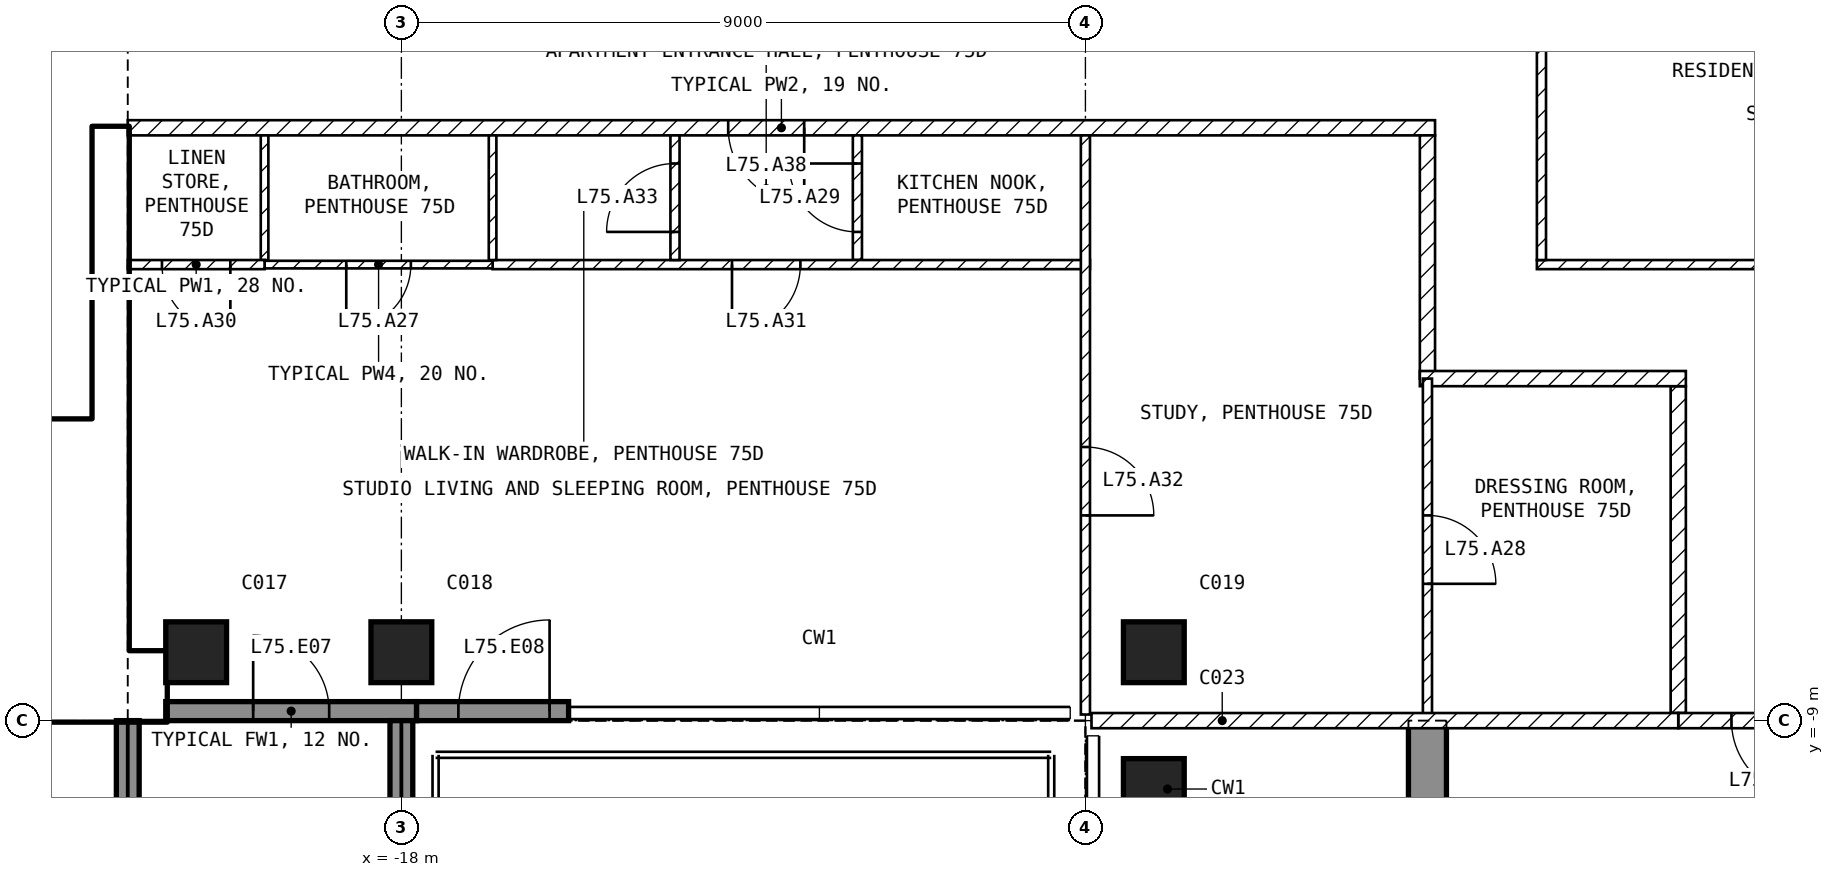
"""IFC4 building model, lengths in metres.
Left out: names, types, materials, properties, quantities, classifications, styles, units other than length and angle.
Written with IfcOpenShell. Run it as: python <this file> out.ifc"""

import sys

from ifc_helpers import new_model, si_unit, direction, frame, frame_2d, origin, origin_2d, place, context, subcontext, project, spatial, polyline, rectangle, outline, extrude, element, fill, save


model = new_model("IFC4")
c1 = context("Model", 3, precision=1e-05, world=origin(), true_north=direction((0.0, 1.0)))
c2 = subcontext(c1, "Body", "Model", "MODEL_VIEW")
j1 = project(units=[si_unit("LENGTHUNIT", "METRE"), si_unit("PLANEANGLEUNIT", "RADIAN")], contexts=[c1])
p1 = place(None, origin())
s1 = spatial("IfcSite", under=j1, at=p1, CompositionType="ELEMENT")
p2 = place(p1, origin())
s2 = spatial("IfcBuilding", under=s1, at=p2, CompositionType="ELEMENT")
p3 = place(p2, frame((0.0, 0.0, 294.6)))
s3 = spatial("IfcBuildingStorey", under=s2, at=p3, CompositionType="ELEMENT", Elevation=294.6)
for number, where, z_axis, x_axis in (
    (1, (-20.7, -8.1, -0.25), (0.0, 0.0, 1.0), (1.0, 0.0, 0.0)),
    (2, (-18.0, -8.1, -0.25), (0.0, 0.0, 1.0), (1.0, 0.0, 0.0)),
    (3, (-8.1, -9.9, -0.25), (0.0, 0.0, 1.0), (1.0, 0.0, 0.0)),
    (4, (-8.1, -8.1, -0.25), (0.0, 0.0, 1.0), (1.0, 0.0, 0.0)),
):
    element("IfcColumn", number, at=place(p3, frame(where, z_axis=z_axis, x_axis=x_axis)), inside=s3, PredefinedType="COLUMN", context=c2, shape_type="SweptSolid", body=[
        extrude(rectangle(XDim=0.8, YDim=0.8, at=origin_2d()), origin(), (0.0, 0.0, 1.0), 4.2),
    ])
p4 = place(p3, frame((-4.75, -13.1, -0.25), z_axis=(1.0, 0.0, 0.0), x_axis=(0.0, 1.0, 0.0)))
e5 = element("IfcWall", 5, at=p4, inside=s3, PredefinedType="SHEAR", context=c2, shape_type="SweptSolid", body=[
    extrude(outline(polyline([(0.0, 0.0), (4.1, 0.0), (4.1, 4.2), (0.0, 4.2), (0.0, 0.0)])), origin(), (0.0, 0.0, 1.0), 0.5),
])
p5 = place(p3, frame((-21.1, -8.875, 0.0), z_axis=(0.0, 0.0, 1.0), x_axis=(1.0, 0.0, 0.0)))
e6 = element("IfcWall", 6, at=p5, inside=s3, PredefinedType="SOLIDWALL", context=c2, shape_type="SweptSolid", body=[
    extrude(rectangle(XDim=3.3, YDim=0.25, at=frame_2d((1.65, 0.0))), origin(), (0.0, 0.0, 1.0), 3.95),
])
p6 = place(p5, frame((1.15, 0.0, 0.0)))
e7 = element("IfcOpeningElement", 7, at=p6, cuts=e6, PredefinedType="OPENING", context=c2, shape_type="SweptSolid", body=[
    extrude(rectangle(XDim=1.0, YDim=2.4, at=frame_2d((0.5, 1.2))), frame((0.0, 0.135, 0.0), z_axis=(0.0, -1.0, 0.0), x_axis=(1.0, 0.0, 0.0)), (0.0, 0.0, 1.0), 0.27),
])
p7 = place(p3, frame((-17.8, -8.875, 0.0), z_axis=(0.0, 0.0, 1.0), x_axis=(1.0, 0.0, 0.0)))
e8 = element("IfcWall", 8, at=p7, inside=s3, PredefinedType="SOLIDWALL", context=c2, shape_type="SweptSolid", body=[
    extrude(rectangle(XDim=2.0, YDim=0.25, at=frame_2d((1.0, 0.0))), origin(), (0.0, 0.0, 1.0), 3.95),
])
p8 = place(p7, frame((0.55, 0.0, 0.0)))
e9 = element("IfcOpeningElement", 9, at=p8, cuts=e8, PredefinedType="OPENING", context=c2, shape_type="SweptSolid", body=[
    extrude(rectangle(XDim=1.2, YDim=2.4, at=frame_2d((0.6, 1.2))), frame((0.0, 0.135, 0.0), z_axis=(0.0, -1.0, 0.0), x_axis=(1.0, 0.0, 0.0)), (0.0, 0.0, 1.0), 0.27),
])
p9 = place(p3, frame((-21.6, -9.0, 0.0), z_axis=(0.0, 0.0, 1.0), x_axis=(0.0, -1.0, 0.0)))
e10 = element("IfcWall", 10, at=p9, inside=s3, PredefinedType="SOLIDWALL", context=c2, shape_type="SweptSolid", body=[
    extrude(rectangle(XDim=2.7, YDim=0.3, at=frame_2d((1.35, 0.0))), origin(), (0.0, 0.0, 1.0), 3.95),
])
p10 = place(p3, frame((-18.0, -9.0, 0.0), z_axis=(0.0, 0.0, 1.0), x_axis=(0.0, -1.0, 0.0)))
e11 = element("IfcWall", 11, at=p10, inside=s3, PredefinedType="SOLIDWALL", context=c2, shape_type="SweptSolid", body=[
    extrude(rectangle(XDim=2.74, YDim=0.3, at=frame_2d((1.37, 0.0))), origin(), (0.0, 0.0, 1.0), 3.95),
])
p11 = place(p3, frame((-30.2, -8.55, 0.0), z_axis=(0.0, 0.0, 1.0), x_axis=(1.0, 0.0, 0.0)))
e12 = element("IfcWall", 12, at=p11, inside=s3, PredefinedType="SHEAR", context=c2, shape_type="SweptSolid", body=[
    extrude(rectangle(XDim=9.1, YDim=0.9, at=frame_2d((4.55, 0.0))), origin(), (0.0, 0.0, 1.0), 3.95),
])
p12 = place(p3, frame((-21.825, -8.1, 0.0), z_axis=(0.0, 0.0, 1.0), x_axis=(0.0, 1.0, 0.0)))
e13 = element("IfcWall", 13, at=p12, inside=s3, PredefinedType="SHEAR", context=c2, shape_type="SweptSolid", body=[
    extrude(rectangle(XDim=6.9, YDim=0.45, at=frame_2d((3.45, 0.0))), origin(), (0.0, 0.0, 1.0), 3.95),
])
p13 = place(p3, frame((-28.35, -5.15, 0.0), z_axis=(0.0, 0.0, 1.0), x_axis=(1.0, 0.0, 0.0)))
e14 = element("IfcWall", 14, at=p13, inside=s3, PredefinedType="SOLIDWALL", context=c2, shape_type="SweptSolid", body=[
    extrude(rectangle(XDim=6.3, YDim=0.2, at=frame_2d((3.15, 0.0))), origin(), (0.0, 0.0, 1.0), 3.95),
])
p14 = place(p13, frame((5.1, 0.0, 0.0)))
e15 = element("IfcOpeningElement", 15, at=p14, cuts=e14, PredefinedType="OPENING", context=c2, shape_type="SweptSolid", body=[
    extrude(rectangle(XDim=1.0, YDim=2.1, at=frame_2d((0.5, 1.05))), frame((0.0, 0.11, 0.0), z_axis=(0.0, -1.0, 0.0), x_axis=(1.0, 0.0, 0.0)), (0.0, 0.0, 1.0), 0.22),
])
p15 = place(p3, frame((-3.06, -3.0, 0.0), z_axis=(0.0, 0.0, 1.0), x_axis=(1.0, 0.0, 0.0)))
e16 = element("IfcWall", 16, at=p15, inside=s3, PredefinedType="PARTITIONING", context=c2, shape_type="SweptSolid", body=[
    extrude(rectangle(XDim=6.12, YDim=0.12, at=frame_2d((3.06, 0.0))), origin(), (0.0, 0.0, 1.0), 3.95),
])
p16 = place(p3, frame((-3.0, 2.94, 0.0), z_axis=(0.0, 0.0, 1.0), x_axis=(0.0, -1.0, 0.0)))
e17 = element("IfcWall", 17, at=p16, inside=s3, PredefinedType="PARTITIONING", context=c2, shape_type="SweptSolid", body=[
    extrude(rectangle(XDim=5.88, YDim=0.12, at=frame_2d((2.94, 0.0))), origin(), (0.0, 0.0, 1.0), 3.95),
])
p17 = place(p3, frame((-4.4, -1.2, 0.0), z_axis=(0.0, 0.0, 1.0), x_axis=(-1.0, 0.0, 0.0)))
e18 = element("IfcWall", 18, at=p17, inside=s3, PredefinedType="PARTITIONING", context=c2, shape_type="SweptSolid", body=[
    extrude(rectangle(XDim=17.2, YDim=0.2, at=frame_2d((8.6, 0.0))), origin(), (0.0, 0.0, 1.0), 3.95),
])
p18 = place(p17, frame((8.3, 0.0, 0.0)))
e19 = element("IfcOpeningElement", 19, at=p18, cuts=e18, PredefinedType="OPENING", context=c2, shape_type="SweptSolid", body=[
    extrude(rectangle(XDim=1.0, YDim=2.1, at=frame_2d((0.5, 1.05))), frame((0.0, 0.11, 0.0), z_axis=(0.0, -1.0, 0.0), x_axis=(1.0, 0.0, 0.0)), (0.0, 0.0, 1.0), 0.22),
])
p19 = place(p3, frame((-4.5, -4.5, 0.0), z_axis=(0.0, 0.0, 1.0), x_axis=(0.0, 1.0, 0.0)))
e20 = element("IfcWall", 20, at=p19, inside=s3, PredefinedType="PARTITIONING", context=c2, shape_type="SweptSolid", body=[
    extrude(rectangle(XDim=3.2, YDim=0.2, at=frame_2d((1.6, 0.0))), origin(), (0.0, 0.0, 1.0), 3.95),
])
p20 = place(p3, frame((-1.2, -8.9, 0.0), z_axis=(0.0, 0.0, 1.0), x_axis=(0.0, 1.0, 0.0)))
e21 = element("IfcWall", 21, at=p20, inside=s3, PredefinedType="PARTITIONING", context=c2, shape_type="SweptSolid", body=[
    extrude(rectangle(XDim=4.3, YDim=0.2, at=frame_2d((2.15, 0.0))), origin(), (0.0, 0.0, 1.0), 3.95),
])
p21 = place(p3, frame((-1.1, -4.5, 0.0), z_axis=(0.0, 0.0, 1.0), x_axis=(-1.0, 0.0, 0.0)))
e22 = element("IfcWall", 22, at=p21, inside=s3, PredefinedType="PARTITIONING", context=c2, shape_type="SweptSolid", body=[
    extrude(rectangle(XDim=3.5, YDim=0.2, at=frame_2d((1.75, 0.0))), origin(), (0.0, 0.0, 1.0), 3.95),
])
p22 = place(p3, frame((1.2, -9.0, 0.0), z_axis=(0.0, 0.0, 1.0), x_axis=(-1.0, 0.0, 0.0)))
e23 = element("IfcWall", 23, at=p22, inside=s3, PredefinedType="PARTITIONING", context=c2, shape_type="SweptSolid", body=[
    extrude(rectangle(XDim=2.4, YDim=0.2, at=frame_2d((1.2, 0.0))), origin(), (0.0, 0.0, 1.0), 3.95),
])
p23 = place(p22, frame((0.7, 0.0, 0.0)))
e24 = element("IfcOpeningElement", 24, at=p23, cuts=e23, PredefinedType="OPENING", context=c2, shape_type="SweptSolid", body=[
    extrude(rectangle(XDim=1.0, YDim=2.1, at=frame_2d((0.5, 1.05))), frame((0.0, 0.11, 0.0), z_axis=(0.0, -1.0, 0.0), x_axis=(1.0, 0.0, 0.0)), (0.0, 0.0, 1.0), 0.22),
])
p24 = place(p3, frame((-12.0, -2.94, 0.0), z_axis=(0.0, 0.0, 1.0), x_axis=(0.0, 1.0, 0.0)))
e25 = element("IfcWall", 25, at=p24, inside=s3, PredefinedType="PARTITIONING", context=c2, shape_type="SweptSolid", body=[
    extrude(rectangle(XDim=1.64, YDim=0.12, at=frame_2d((0.82, 0.0))), origin(), (0.0, 0.0, 1.0), 3.95),
])
p25 = place(p24, frame((0.37, 0.0, 0.0)))
e26 = element("IfcOpeningElement", 26, at=p25, cuts=e25, PredefinedType="OPENING", context=c2, shape_type="SweptSolid", body=[
    extrude(rectangle(XDim=0.9, YDim=2.1, at=frame_2d((0.45, 1.05))), frame((0.0, 0.07, 0.0), z_axis=(0.0, -1.0, 0.0), x_axis=(1.0, 0.0, 0.0)), (0.0, 0.0, 1.0), 0.14),
])
p26 = place(p3, frame((-8.94, -3.0, 0.0), z_axis=(0.0, 0.0, 1.0), x_axis=(-1.0, 0.0, 0.0)))
e27 = element("IfcWall", 27, at=p26, inside=s3, PredefinedType="PARTITIONING", context=c2, shape_type="SweptSolid", body=[
    extrude(rectangle(XDim=7.86, YDim=0.12, at=frame_2d((3.93, 0.0))), origin(), (0.0, 0.0, 1.0), 3.95),
])
p27 = place(p26, frame((3.81, 0.0, 0.0)))
e28 = element("IfcOpeningElement", 28, at=p27, cuts=e27, PredefinedType="OPENING", context=c2, shape_type="SweptSolid", body=[
    extrude(rectangle(XDim=0.9, YDim=2.1, at=frame_2d((0.45, 1.05))), frame((0.0, 0.07, 0.0), z_axis=(0.0, -1.0, 0.0), x_axis=(1.0, 0.0, 0.0)), (0.0, 0.0, 1.0), 0.14),
])
p28 = place(p3, frame((-9.0, -1.3, 0.0), z_axis=(0.0, 0.0, 1.0), x_axis=(0.0, -1.0, 0.0)))
e29 = element("IfcWall", 29, at=p28, inside=s3, PredefinedType="PARTITIONING", context=c2, shape_type="SweptSolid", body=[
    extrude(rectangle(XDim=7.62, YDim=0.12, at=frame_2d((3.81, 0.0))), origin(), (0.0, 0.0, 1.0), 3.95),
])
p29 = place(p28, frame((4.1, 0.0, 0.0)))
e30 = element("IfcOpeningElement", 30, at=p29, cuts=e29, PredefinedType="OPENING", context=c2, shape_type="SweptSolid", body=[
    extrude(rectangle(XDim=0.9, YDim=2.1, at=frame_2d((0.45, 1.05))), frame((0.0, 0.07, 0.0), z_axis=(0.0, -1.0, 0.0), x_axis=(1.0, 0.0, 0.0)), (0.0, 0.0, 1.0), 0.14),
])
p30 = place(p3, frame((-14.4, -2.94, 0.0), z_axis=(0.0, 0.0, 1.0), x_axis=(0.0, 1.0, 0.0)))
e31 = element("IfcWall", 31, at=p30, inside=s3, PredefinedType="PARTITIONING", context=c2, shape_type="SweptSolid", body=[
    extrude(rectangle(XDim=1.64, YDim=0.12, at=frame_2d((0.82, 0.0))), origin(), (0.0, 0.0, 1.0), 3.95),
])
p31 = place(p30, frame((0.37, 0.0, 0.0)))
e32 = element("IfcOpeningElement", 32, at=p31, cuts=e31, PredefinedType="OPENING", context=c2, shape_type="SweptSolid", body=[
    extrude(rectangle(XDim=0.9, YDim=2.1, at=frame_2d((0.45, 1.05))), frame((0.0, 0.07, 0.0), z_axis=(0.0, -1.0, 0.0), x_axis=(1.0, 0.0, 0.0)), (0.0, 0.0, 1.0), 0.14),
])
for number, where, z_axis, x_axis in (
    (33, (-16.8, -2.94, 0.0), (0.0, 0.0, 1.0), (0.0, 1.0, 0.0)),
    (34, (-19.8, -2.94, 0.0), (0.0, 0.0, 1.0), (0.0, 1.0, 0.0)),
):
    element("IfcWall", number, at=place(p3, frame(where, z_axis=z_axis, x_axis=x_axis)), inside=s3, PredefinedType="PARTITIONING", context=c2, shape_type="SweptSolid", body=[
        extrude(rectangle(XDim=1.64, YDim=0.1, at=frame_2d((0.82, 0.0))), origin(), (0.0, 0.0, 1.0), 3.95),
    ])
p32 = place(p3, frame((-16.8, -3.0, 0.0), z_axis=(0.0, 0.0, 1.0), x_axis=(-1.0, 0.0, 0.0)))
e35 = element("IfcWall", 35, at=p32, inside=s3, PredefinedType="PARTITIONING", context=c2, shape_type="SweptSolid", body=[
    extrude(rectangle(XDim=3.0, YDim=0.1, at=frame_2d((1.5, 0.0))), origin(), (0.0, 0.0, 1.0), 3.95),
])
p33 = place(p32, frame((1.075, 0.0, 0.0)))
e36 = element("IfcOpeningElement", 36, at=p33, cuts=e35, PredefinedType="OPENING", context=c2, shape_type="SweptSolid", body=[
    extrude(rectangle(XDim=0.85, YDim=2.1, at=frame_2d((0.425, 1.05))), frame((0.0, 0.06, 0.0), z_axis=(0.0, -1.0, 0.0), x_axis=(1.0, 0.0, 0.0)), (0.0, 0.0, 1.0), 0.12),
])
p34 = place(p3, frame((-19.8, -3.0, 0.0), z_axis=(0.0, 0.0, 1.0), x_axis=(-1.0, 0.0, 0.0)))
e37 = element("IfcWall", 37, at=p34, inside=s3, PredefinedType="PARTITIONING", context=c2, shape_type="SweptSolid", body=[
    extrude(rectangle(XDim=1.8, YDim=0.12, at=frame_2d((0.9, 0.0))), origin(), (0.0, 0.0, 1.0), 3.95),
])
p35 = place(p34, frame((0.45, 0.0, 0.0)))
e38 = element("IfcOpeningElement", 38, at=p35, cuts=e37, PredefinedType="OPENING", context=c2, shape_type="SweptSolid", body=[
    extrude(rectangle(XDim=0.9, YDim=2.1, at=frame_2d((0.45, 1.05))), frame((0.0, 0.07, 0.0), z_axis=(0.0, -1.0, 0.0), x_axis=(1.0, 0.0, 0.0)), (0.0, 0.0, 1.0), 0.14),
])
p36 = place(p3, frame((-4.5, -4.5, 0.0), z_axis=(0.0, 0.0, 1.0), x_axis=(0.0, -1.0, 0.0)))
e39 = element("IfcWall", 39, at=p36, inside=s3, PredefinedType="PARTITIONING", context=c2, shape_type="SweptSolid", body=[
    extrude(rectangle(XDim=4.5, YDim=0.12, at=frame_2d((2.25, 0.0))), origin(), (0.0, 0.0, 1.0), 3.95),
])
p37 = place(p36, frame((1.8, 0.0, 0.0)))
e40 = element("IfcOpeningElement", 40, at=p37, cuts=e39, PredefinedType="OPENING", context=c2, shape_type="SweptSolid", body=[
    extrude(rectangle(XDim=0.9, YDim=2.1, at=frame_2d((0.45, 1.05))), frame((0.0, 0.07, 0.0), z_axis=(0.0, -1.0, 0.0), x_axis=(1.0, 0.0, 0.0)), (0.0, 0.0, 1.0), 0.14),
])
p38 = place(p3, frame((-1.2, -9.0, 0.0), z_axis=(0.0, 0.0, 1.0), x_axis=(-1.0, 0.0, 0.0)))
e41 = element("IfcWall", 41, at=p38, inside=s3, PredefinedType="PARTITIONING", context=c2, shape_type="SweptSolid", body=[
    extrude(rectangle(XDim=7.72, YDim=0.2, at=frame_2d((3.86, 0.0))), origin(), (0.0, 0.0, 1.0), 3.95),
])
p39 = place(p6, origin())
e42 = element("IfcDoor", 42, at=p39, inside=s3, OperationType="SINGLE_SWING_LEFT", PredefinedType="DOOR", context=c2, shape_type="SweptSolid", body=[
    extrude(rectangle(XDim=1.0, YDim=2.4, at=frame_2d((0.5, 1.2))), frame((0.0, 0.025, 0.0), z_axis=(0.0, -1.0, 0.0), x_axis=(1.0, 0.0, 0.0)), (0.0, 0.0, 1.0), 0.05),
])
fill(e7, e42)
p40 = place(p8, origin())
e43 = element("IfcDoor", 43, at=p40, inside=s3, OperationType="SINGLE_SWING_RIGHT", PredefinedType="DOOR", context=c2, shape_type="SweptSolid", body=[
    extrude(rectangle(XDim=1.2, YDim=2.4, at=frame_2d((0.6, 1.2))), frame((0.0, 0.025, 0.0), z_axis=(0.0, -1.0, 0.0), x_axis=(1.0, 0.0, 0.0)), (0.0, 0.0, 1.0), 0.05),
])
fill(e9, e43)
p41 = place(p14, origin())
e44 = element("IfcDoor", 44, at=p41, inside=s3, OperationType="SINGLE_SWING_LEFT", PredefinedType="DOOR", context=c2, shape_type="SweptSolid", body=[
    extrude(rectangle(XDim=1.0, YDim=2.1, at=frame_2d((0.5, 1.05))), frame((0.0, 0.025, 0.0), z_axis=(0.0, -1.0, 0.0), x_axis=(1.0, 0.0, 0.0)), (0.0, 0.0, 1.0), 0.05),
])
fill(e15, e44)
p42 = place(p33, origin())
e45 = element("IfcDoor", 45, at=p42, inside=s3, OperationType="SINGLE_SWING_RIGHT", PredefinedType="DOOR", context=c2, shape_type="SweptSolid", body=[
    extrude(rectangle(XDim=0.85, YDim=2.1, at=frame_2d((0.425, 1.05))), frame((0.0, 0.025, 0.0), z_axis=(0.0, -1.0, 0.0), x_axis=(1.0, 0.0, 0.0)), (0.0, 0.0, 1.0), 0.05),
])
fill(e36, e45)
p43 = place(p37, origin())
e46 = element("IfcDoor", 46, at=p43, inside=s3, OperationType="SINGLE_SWING_RIGHT", PredefinedType="DOOR", context=c2, shape_type="SweptSolid", body=[
    extrude(rectangle(XDim=0.9, YDim=2.1, at=frame_2d((0.45, 1.05))), frame((0.0, 0.025, 0.0), z_axis=(0.0, -1.0, 0.0), x_axis=(1.0, 0.0, 0.0)), (0.0, 0.0, 1.0), 0.05),
])
fill(e40, e46)
p44 = place(p25, origin())
e47 = element("IfcDoor", 47, at=p44, inside=s3, OperationType="SINGLE_SWING_RIGHT", PredefinedType="DOOR", context=c2, shape_type="SweptSolid", body=[
    extrude(rectangle(XDim=0.9, YDim=2.1, at=frame_2d((0.45, 1.05))), frame((0.0, 0.025, 0.0), z_axis=(0.0, -1.0, 0.0), x_axis=(1.0, 0.0, 0.0)), (0.0, 0.0, 1.0), 0.05),
])
fill(e26, e47)
p45 = place(p35, origin())
e48 = element("IfcDoor", 48, at=p45, inside=s3, OperationType="SINGLE_SWING_LEFT", PredefinedType="DOOR", context=c2, shape_type="SweptSolid", body=[
    extrude(rectangle(XDim=0.9, YDim=2.1, at=frame_2d((0.45, 1.05))), frame((0.0, 0.025, 0.0), z_axis=(0.0, -1.0, 0.0), x_axis=(1.0, 0.0, 0.0)), (0.0, 0.0, 1.0), 0.05),
])
fill(e38, e48)
p46 = place(p27, origin())
e49 = element("IfcDoor", 49, at=p46, inside=s3, OperationType="SINGLE_SWING_RIGHT", PredefinedType="DOOR", context=c2, shape_type="SweptSolid", body=[
    extrude(rectangle(XDim=0.9, YDim=2.1, at=frame_2d((0.45, 1.05))), frame((0.0, 0.025, 0.0), z_axis=(0.0, -1.0, 0.0), x_axis=(1.0, 0.0, 0.0)), (0.0, 0.0, 1.0), 0.05),
])
fill(e28, e49)
p47 = place(p29, origin())
e50 = element("IfcDoor", 50, at=p47, inside=s3, OperationType="SINGLE_SWING_RIGHT", PredefinedType="DOOR", context=c2, shape_type="SweptSolid", body=[
    extrude(rectangle(XDim=0.9, YDim=2.1, at=frame_2d((0.45, 1.05))), frame((0.0, 0.025, 0.0), z_axis=(0.0, -1.0, 0.0), x_axis=(1.0, 0.0, 0.0)), (0.0, 0.0, 1.0), 0.05),
])
fill(e30, e50)
p48 = place(p31, origin())
e51 = element("IfcDoor", 51, at=p48, inside=s3, OperationType="SINGLE_SWING_LEFT", PredefinedType="DOOR", context=c2, shape_type="SweptSolid", body=[
    extrude(rectangle(XDim=0.9, YDim=2.1, at=frame_2d((0.45, 1.05))), frame((0.0, 0.025, 0.0), z_axis=(0.0, -1.0, 0.0), x_axis=(1.0, 0.0, 0.0)), (0.0, 0.0, 1.0), 0.05),
])
fill(e32, e51)
p49 = place(p23, origin())
e52 = element("IfcDoor", 52, at=p49, inside=s3, OperationType="SINGLE_SWING_LEFT", PredefinedType="DOOR", context=c2, shape_type="SweptSolid", body=[
    extrude(rectangle(XDim=1.0, YDim=2.1, at=frame_2d((0.5, 1.05))), frame((0.0, 0.025, 0.0), z_axis=(0.0, -1.0, 0.0), x_axis=(1.0, 0.0, 0.0)), (0.0, 0.0, 1.0), 0.05),
])
fill(e24, e52)
p50 = place(p18, origin())
e53 = element("IfcDoor", 53, at=p50, inside=s3, OperationType="SINGLE_SWING_LEFT", PredefinedType="DOOR", context=c2, shape_type="SweptSolid", body=[
    extrude(rectangle(XDim=1.0, YDim=2.1, at=frame_2d((0.5, 1.05))), frame((0.0, 0.025, 0.0), z_axis=(0.0, -1.0, 0.0), x_axis=(1.0, 0.0, 0.0)), (0.0, 0.0, 1.0), 0.05),
])
fill(e19, e53)
save(model, sys.argv[1])
